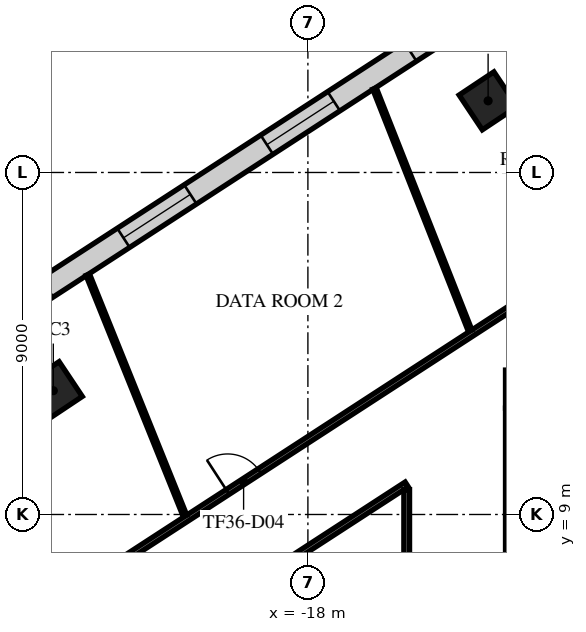
"""IFC4 building model, lengths in metres.
Left out: names, types, materials, properties, quantities, classifications, styles, units other than length and angle.
Written with IfcOpenShell. Run it as: python <this file> out.ifc"""

import sys

from ifc_helpers import new_model, si_unit, direction, frame, frame_2d, origin, origin_2d, place, context, subcontext, project, spatial, rectangle, extrude, element, fill, save


model = new_model("IFC4")
c1 = context("Model", 3, precision=1e-05, world=origin(), true_north=direction((0.0, 1.0)))
c2 = subcontext(c1, "Body", "Model", "MODEL_VIEW")
j1 = project(units=[si_unit("LENGTHUNIT", "METRE"), si_unit("PLANEANGLEUNIT", "RADIAN")], contexts=[c1])
p1 = place(None, origin())
s1 = spatial("IfcSite", under=j1, at=p1, CompositionType="ELEMENT")
p2 = place(p1, origin())
s2 = spatial("IfcBuilding", under=s1, at=p2, CompositionType="ELEMENT")
p3 = place(p2, frame((0.0, 0.0, 155.7)))
s3 = spatial("IfcBuildingStorey", under=s2, at=p3, CompositionType="ELEMENT", Elevation=155.7)
for number, where, z_axis, x_axis in (
    (1, (-13.258, 19.885, 0.0), (0.0, 0.0, 1.0), (0.832, 0.555, 0.0)),
    (2, (-24.699, 12.258, 0.0), (0.0, 0.0, 1.0), (0.832, 0.555, 0.0)),
):
    element("IfcColumn", number, at=place(p3, frame(where, z_axis=z_axis, x_axis=x_axis)), inside=s3, PredefinedType="COLUMN", context=c2, shape_type="SweptSolid", body=[
        extrude(rectangle(XDim=1.1, YDim=1.1, at=origin_2d()), origin(), (0.0, 0.0, 1.0), 4.0),
    ])
p4 = place(p3, frame((-12.8, 12.3, 0.0), z_axis=(0.0, 0.0, 1.0), x_axis=(1.0, 0.0, 0.0)))
e3 = element("IfcWall", 3, at=p4, inside=s3, PredefinedType="SHEAR", context=c2, shape_type="SweptSolid", body=[
    extrude(rectangle(XDim=25.6, YDim=1.0, at=frame_2d((12.8, 0.0))), origin(), (0.0, 0.0, 1.0), 3.6),
])
p5 = place(p4, frame((11.6, 0.0, 0.0)))
e4 = element("IfcOpeningElement", 4, at=p5, cuts=e3, PredefinedType="OPENING", context=c2, shape_type="SweptSolid", body=[
    extrude(rectangle(XDim=2.4, YDim=2.4, at=frame_2d((1.2, 1.2))), frame((0.0, 0.51, 0.0), z_axis=(0.0, -1.0, 0.0), x_axis=(1.0, 0.0, 0.0)), (0.0, 0.0, 1.0), 1.02),
])
p6 = place(p4, frame((22.425, 0.0, 0.0)))
e5 = element("IfcOpeningElement", 5, at=p6, cuts=e3, PredefinedType="OPENING", context=c2, shape_type="SweptSolid", body=[
    extrude(rectangle(XDim=1.2, YDim=2.1, at=frame_2d((0.6, 1.05))), frame((0.0, 0.51, 0.0), z_axis=(0.0, -1.0, 0.0), x_axis=(1.0, 0.0, 0.0)), (0.0, 0.0, 1.0), 1.02),
])
p7 = place(p4, frame((1.4, 0.0, 0.0)))
e6 = element("IfcOpeningElement", 6, at=p7, cuts=e3, PredefinedType="OPENING", context=c2, shape_type="SweptSolid", body=[
    extrude(rectangle(XDim=1.0, YDim=2.1, at=frame_2d((0.5, 1.05))), frame((0.0, 0.51, 0.0), z_axis=(0.0, -1.0, 0.0), x_axis=(1.0, 0.0, 0.0)), (0.0, 0.0, 1.0), 1.02),
])
p8 = place(p3, frame((-12.3, -11.8, 0.0), z_axis=(0.0, 0.0, 1.0), x_axis=(0.0, 1.0, 0.0)))
e7 = element("IfcWall", 7, at=p8, inside=s3, PredefinedType="SHEAR", context=c2, shape_type="SweptSolid", body=[
    extrude(rectangle(XDim=23.6, YDim=1.0, at=frame_2d((11.8, 0.0))), origin(), (0.0, 0.0, 1.0), 3.6),
])
p9 = place(p8, frame((10.6, 0.0, 0.0)))
e8 = element("IfcOpeningElement", 8, at=p9, cuts=e7, PredefinedType="OPENING", context=c2, shape_type="SweptSolid", body=[
    extrude(rectangle(XDim=2.4, YDim=2.4, at=frame_2d((1.2, 1.2))), frame((0.0, 0.51, 0.0), z_axis=(0.0, -1.0, 0.0), x_axis=(1.0, 0.0, 0.0)), (0.0, 0.0, 1.0), 1.02),
])
p10 = place(p3, frame((6.333, 35.233, 0.0), z_axis=(0.0, 0.0, 1.0), x_axis=(-0.83867264201, -0.544635841222, 0.0)))
e9 = element("IfcWall", 9, at=p10, inside=s3, PredefinedType="STANDARD", context=c2, shape_type="SweptSolid", body=[
    extrude(rectangle(XDim=49.376, YDim=0.6, at=frame_2d((24.688, 0.0))), origin(), (0.0, 0.0, 1.0), 3.6),
])
p11 = place(p10, frame((1.2, 0.0, 0.9)))
e10 = element("IfcOpeningElement", 10, at=p11, cuts=e9, PredefinedType="OPENING", context=c2, shape_type="SweptSolid", body=[
    extrude(rectangle(XDim=2.1, YDim=2.1, at=frame_2d((1.05, 1.05))), frame((0.0, 0.31, 0.0), z_axis=(0.0, -1.0, 0.0), x_axis=(1.0, 0.0, 0.0)), (0.0, 0.0, 1.0), 0.62),
])
p12 = place(p10, frame((5.7, 0.0, 0.9)))
e11 = element("IfcOpeningElement", 11, at=p12, cuts=e9, PredefinedType="OPENING", context=c2, shape_type="SweptSolid", body=[
    extrude(rectangle(XDim=2.1, YDim=2.1, at=frame_2d((1.05, 1.05))), frame((0.0, 0.31, 0.0), z_axis=(0.0, -1.0, 0.0), x_axis=(1.0, 0.0, 0.0)), (0.0, 0.0, 1.0), 0.62),
])
p13 = place(p10, frame((10.2, 0.0, 0.9)))
e12 = element("IfcOpeningElement", 12, at=p13, cuts=e9, PredefinedType="OPENING", context=c2, shape_type="SweptSolid", body=[
    extrude(rectangle(XDim=2.1, YDim=2.1, at=frame_2d((1.05, 1.05))), frame((0.0, 0.31, 0.0), z_axis=(0.0, -1.0, 0.0), x_axis=(1.0, 0.0, 0.0)), (0.0, 0.0, 1.0), 0.62),
])
p14 = place(p10, frame((14.7, 0.0, 0.9)))
e13 = element("IfcOpeningElement", 13, at=p14, cuts=e9, PredefinedType="OPENING", context=c2, shape_type="SweptSolid", body=[
    extrude(rectangle(XDim=2.1, YDim=2.1, at=frame_2d((1.05, 1.05))), frame((0.0, 0.31, 0.0), z_axis=(0.0, -1.0, 0.0), x_axis=(1.0, 0.0, 0.0)), (0.0, 0.0, 1.0), 0.62),
])
p15 = place(p10, frame((19.2, 0.0, 0.9)))
e14 = element("IfcOpeningElement", 14, at=p15, cuts=e9, PredefinedType="OPENING", context=c2, shape_type="SweptSolid", body=[
    extrude(rectangle(XDim=2.1, YDim=2.1, at=frame_2d((1.05, 1.05))), frame((0.0, 0.31, 0.0), z_axis=(0.0, -1.0, 0.0), x_axis=(1.0, 0.0, 0.0)), (0.0, 0.0, 1.0), 0.62),
])
p16 = place(p10, frame((23.7, 0.0, 0.9)))
e15 = element("IfcOpeningElement", 15, at=p16, cuts=e9, PredefinedType="OPENING", context=c2, shape_type="SweptSolid", body=[
    extrude(rectangle(XDim=2.1, YDim=2.1, at=frame_2d((1.05, 1.05))), frame((0.0, 0.31, 0.0), z_axis=(0.0, -1.0, 0.0), x_axis=(1.0, 0.0, 0.0)), (0.0, 0.0, 1.0), 0.62),
])
p17 = place(p10, frame((28.2, 0.0, 0.9)))
e16 = element("IfcOpeningElement", 16, at=p17, cuts=e9, PredefinedType="OPENING", context=c2, shape_type="SweptSolid", body=[
    extrude(rectangle(XDim=2.1, YDim=2.1, at=frame_2d((1.05, 1.05))), frame((0.0, 0.31, 0.0), z_axis=(0.0, -1.0, 0.0), x_axis=(1.0, 0.0, 0.0)), (0.0, 0.0, 1.0), 0.62),
])
p18 = place(p10, frame((32.7, 0.0, 0.9)))
e17 = element("IfcOpeningElement", 17, at=p18, cuts=e9, PredefinedType="OPENING", context=c2, shape_type="SweptSolid", body=[
    extrude(rectangle(XDim=2.1, YDim=2.1, at=frame_2d((1.05, 1.05))), frame((0.0, 0.31, 0.0), z_axis=(0.0, -1.0, 0.0), x_axis=(1.0, 0.0, 0.0)), (0.0, 0.0, 1.0), 0.62),
])
p19 = place(p10, frame((37.2, 0.0, 0.9)))
e18 = element("IfcOpeningElement", 18, at=p19, cuts=e9, PredefinedType="OPENING", context=c2, shape_type="SweptSolid", body=[
    extrude(rectangle(XDim=2.1, YDim=2.1, at=frame_2d((1.05, 1.05))), frame((0.0, 0.31, 0.0), z_axis=(0.0, -1.0, 0.0), x_axis=(1.0, 0.0, 0.0)), (0.0, 0.0, 1.0), 0.62),
])
p20 = place(p10, frame((41.7, 0.0, 0.9)))
e19 = element("IfcOpeningElement", 19, at=p20, cuts=e9, PredefinedType="OPENING", context=c2, shape_type="SweptSolid", body=[
    extrude(rectangle(XDim=2.1, YDim=2.1, at=frame_2d((1.05, 1.05))), frame((0.0, 0.31, 0.0), z_axis=(0.0, -1.0, 0.0), x_axis=(1.0, 0.0, 0.0)), (0.0, 0.0, 1.0), 0.62),
])
p21 = place(p10, frame((46.138, 0.0, 0.9)))
e20 = element("IfcOpeningElement", 20, at=p21, cuts=e9, PredefinedType="OPENING", context=c2, shape_type="SweptSolid", body=[
    extrude(rectangle(XDim=2.1, YDim=2.1, at=frame_2d((1.05, 1.05))), frame((0.0, 0.31, 0.0), z_axis=(0.0, -1.0, 0.0), x_axis=(1.0, 0.0, 0.0)), (0.0, 0.0, 1.0), 0.62),
])
p22 = place(p3, frame((-25.134, 6.331, 0.0), z_axis=(0.0, 0.0, 1.0), x_axis=(0.838655992286, 0.544661478904, 0.0)))
e21 = element("IfcWall", 21, at=p22, inside=s3, PredefinedType="PARTITIONING", context=c2, shape_type="SweptSolid", body=[
    extrude(rectangle(XDim=35.262, YDim=0.15, at=frame_2d((17.631, 0.0))), origin(), (0.0, 0.0, 1.0), 3.15),
])
p23 = place(p22, frame((0.55, 0.0, 0.0)))
e22 = element("IfcOpeningElement", 22, at=p23, cuts=e21, PredefinedType="OPENING", context=c2, shape_type="SweptSolid", body=[
    extrude(rectangle(XDim=1.0, YDim=2.1, at=frame_2d((0.5, 1.05))), frame((0.0, 0.085, 0.0), z_axis=(0.0, -1.0, 0.0), x_axis=(1.0, 0.0, 0.0)), (0.0, 0.0, 1.0), 0.17),
])
p24 = place(p22, frame((5.989, 0.0, 0.0)))
e23 = element("IfcOpeningElement", 23, at=p24, cuts=e21, PredefinedType="OPENING", context=c2, shape_type="SweptSolid", body=[
    extrude(rectangle(XDim=1.0, YDim=2.1, at=frame_2d((0.5, 1.05))), frame((0.0, 0.085, 0.0), z_axis=(0.0, -1.0, 0.0), x_axis=(1.0, 0.0, 0.0)), (0.0, 0.0, 1.0), 0.17),
])
p25 = place(p22, frame((17.183, 0.0, 0.0)))
e24 = element("IfcOpeningElement", 24, at=p25, cuts=e21, PredefinedType="OPENING", context=c2, shape_type="SweptSolid", body=[
    extrude(rectangle(XDim=1.0, YDim=2.1, at=frame_2d((0.5, 1.05))), frame((0.0, 0.085, 0.0), z_axis=(0.0, -1.0, 0.0), x_axis=(1.0, 0.0, 0.0)), (0.0, 0.0, 1.0), 0.17),
])
p26 = place(p22, frame((25.102, 0.0, 0.0)))
e25 = element("IfcOpeningElement", 25, at=p26, cuts=e21, PredefinedType="OPENING", context=c2, shape_type="SweptSolid", body=[
    extrude(rectangle(XDim=1.0, YDim=2.1, at=frame_2d((0.5, 1.05))), frame((0.0, 0.085, 0.0), z_axis=(0.0, -1.0, 0.0), x_axis=(1.0, 0.0, 0.0)), (0.0, 0.0, 1.0), 0.17),
])
p27 = place(p3, frame((-23.764, 4.36, 0.0), z_axis=(0.0, 0.0, 1.0), x_axis=(0.838700804406, 0.544592472119, 0.0)))
e26 = element("IfcWall", 26, at=p27, inside=s3, PredefinedType="PARTITIONING", context=c2, shape_type="SweptSolid", body=[
    extrude(rectangle(XDim=9.973, YDim=0.15, at=frame_2d((4.986, 0.0))), origin(), (0.0, 0.0, 1.0), 3.15),
])
p28 = place(p3, frame((-15.4, -10.773, 0.0), z_axis=(0.0, 0.0, 1.0), x_axis=(0.0, 1.0, 0.0)))
e27 = element("IfcWall", 27, at=p28, inside=s3, PredefinedType="PARTITIONING", context=c2, shape_type="SweptSolid", body=[
    extrude(rectangle(XDim=20.426, YDim=0.15, at=frame_2d((10.213, 0.0))), origin(), (0.0, 0.0, 1.0), 3.15),
])
p29 = place(p28, frame((6.55, 0.0, 0.0)))
e28 = element("IfcOpeningElement", 28, at=p29, cuts=e27, PredefinedType="OPENING", context=c2, shape_type="SweptSolid", body=[
    extrude(rectangle(XDim=1.8, YDim=2.1, at=frame_2d((0.9, 1.05))), frame((0.0, 0.085, 0.0), z_axis=(0.0, -1.0, 0.0), x_axis=(1.0, 0.0, 0.0)), (0.0, 0.0, 1.0), 0.17),
])
p30 = place(p28, frame((15.746, 0.0, 0.0)))
e29 = element("IfcOpeningElement", 29, at=p30, cuts=e27, PredefinedType="OPENING", context=c2, shape_type="SweptSolid", body=[
    extrude(rectangle(XDim=1.0, YDim=2.1, at=frame_2d((0.5, 1.05))), frame((0.0, 0.085, 0.0), z_axis=(0.0, -1.0, 0.0), x_axis=(1.0, 0.0, 0.0)), (0.0, 0.0, 1.0), 0.17),
])
p31 = place(p3, frame((-23.792, 15.31, 0.0), z_axis=(0.0, 0.0, 1.0), x_axis=(0.373850501152, -0.927488977179, 0.0)))
e30 = element("IfcWall", 30, at=p31, inside=s3, PredefinedType="PARTITIONING", context=c2, shape_type="SweptSolid", body=[
    extrude(rectangle(XDim=6.841, YDim=0.1, at=frame_2d((3.421, 0.0))), origin(), (0.0, 0.0, 1.0), 2.9),
])
p32 = place(p3, frame((-16.247, 20.209, 0.0), z_axis=(0.0, 0.0, 1.0), x_axis=(0.367220899636, -0.930133759666, 0.0)))
e31 = element("IfcWall", 31, at=p32, inside=s3, PredefinedType="PARTITIONING", context=c2, shape_type="SweptSolid", body=[
    extrude(rectangle(XDim=6.85, YDim=0.1, at=frame_2d((3.425, 0.0))), origin(), (0.0, 0.0, 1.0), 2.9),
])
p33 = place(p16, origin())
e32 = element("IfcWindow", 32, at=p33, inside=s3, PartitioningType="SINGLE_PANEL", PredefinedType="WINDOW", context=c2, shape_type="SweptSolid", body=[
    extrude(rectangle(XDim=2.1, YDim=2.1, at=frame_2d((1.05, 1.05))), frame((0.0, 0.03, 0.0), z_axis=(0.0, -1.0, 0.0), x_axis=(1.0, 0.0, 0.0)), (0.0, 0.0, 1.0), 0.06),
])
fill(e15, e32)
p34 = place(p17, origin())
e33 = element("IfcWindow", 33, at=p34, inside=s3, PartitioningType="SINGLE_PANEL", PredefinedType="WINDOW", context=c2, shape_type="SweptSolid", body=[
    extrude(rectangle(XDim=2.1, YDim=2.1, at=frame_2d((1.05, 1.05))), frame((0.0, 0.03, 0.0), z_axis=(0.0, -1.0, 0.0), x_axis=(1.0, 0.0, 0.0)), (0.0, 0.0, 1.0), 0.06),
])
fill(e16, e33)
p35 = place(p18, origin())
e34 = element("IfcWindow", 34, at=p35, inside=s3, PartitioningType="SINGLE_PANEL", PredefinedType="WINDOW", context=c2, shape_type="SweptSolid", body=[
    extrude(rectangle(XDim=2.1, YDim=2.1, at=frame_2d((1.05, 1.05))), frame((0.0, 0.03, 0.0), z_axis=(0.0, -1.0, 0.0), x_axis=(1.0, 0.0, 0.0)), (0.0, 0.0, 1.0), 0.06),
])
fill(e17, e34)
p36 = place(p24, origin())
e35 = element("IfcDoor", 35, at=p36, inside=s3, OperationType="SINGLE_SWING_LEFT", PredefinedType="DOOR", context=c2, shape_type="SweptSolid", body=[
    extrude(rectangle(XDim=1.0, YDim=2.1, at=frame_2d((0.5, 1.05))), frame((0.0, 0.025, 0.0), z_axis=(0.0, -1.0, 0.0), x_axis=(1.0, 0.0, 0.0)), (0.0, 0.0, 1.0), 0.05),
])
fill(e23, e35)
save(model, sys.argv[1])
